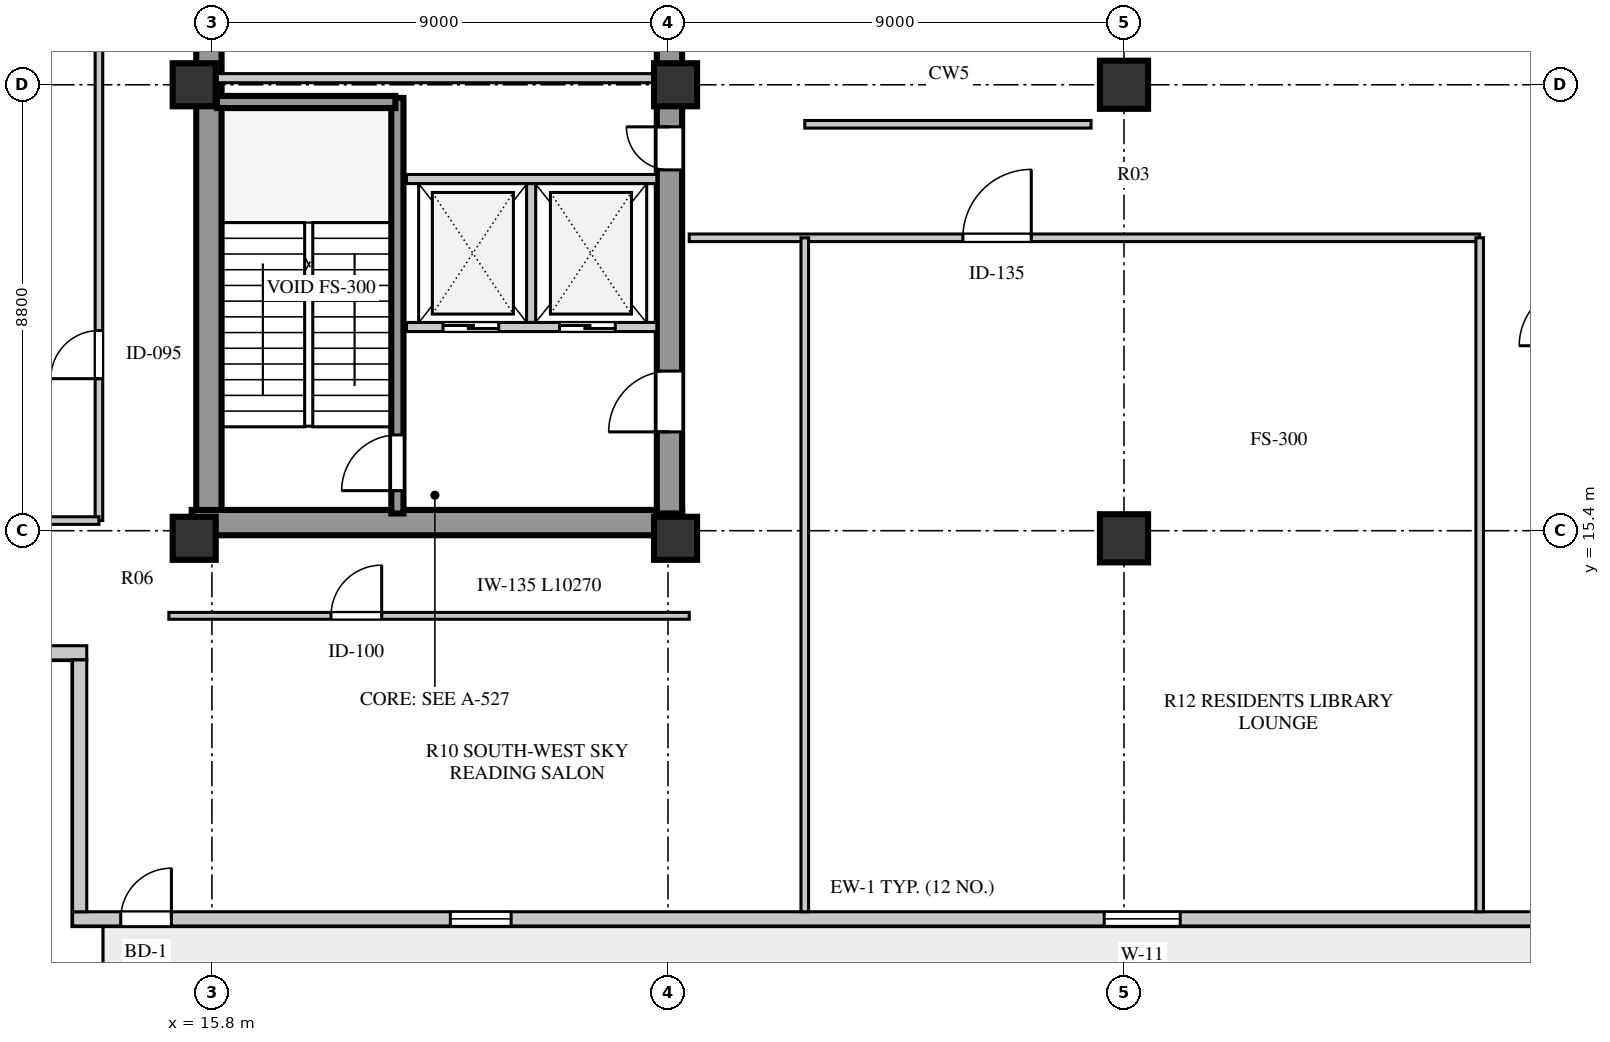
"""IFC4 building model, lengths in metres.
Left out: names, types, materials, properties, quantities, classifications, styles, units other than length and angle.
Written with IfcOpenShell. Run it as: python <this file> out.ifc"""

import sys

from ifc_helpers import new_model, si_unit, direction, frame, frame_2d, origin, origin_2d, place, context, subcontext, project, spatial, rectangle, extrude, element, fill, save


model = new_model("IFC4")
c1 = context("Model", 3, precision=1e-05, world=origin(), true_north=direction((0.0, 1.0)))
c2 = subcontext(c1, "Body", "Model", "MODEL_VIEW")
j1 = project(units=[si_unit("LENGTHUNIT", "METRE"), si_unit("PLANEANGLEUNIT", "RADIAN")], contexts=[c1])
p1 = place(None, origin())
s1 = spatial("IfcSite", under=j1, at=p1, CompositionType="ELEMENT")
p2 = place(p1, origin())
s2 = spatial("IfcBuilding", under=s1, at=p2, CompositionType="ELEMENT")
p3 = place(p2, frame((0.0, 0.0, 208.9)))
s3 = spatial("IfcBuildingStorey", under=s2, at=p3, CompositionType="ELEMENT", Elevation=208.9)
p4 = place(p3, frame((15.4, 15.56, 0.0), z_axis=(0.0, 0.0, 1.0), x_axis=(1.0, 0.0, 0.0)))
e1 = element("IfcWall", 1, at=p4, inside=s3, PredefinedType="SHEAR", context=c2, shape_type="SweptSolid", body=[
    extrude(rectangle(XDim=9.68, YDim=0.5, at=frame_2d((4.84, 0.0))), origin(), (0.0, 0.0, 1.0), 4.96),
])
p5 = place(p3, frame((15.74, 15.81, 0.0), z_axis=(0.0, 0.0, 1.0), x_axis=(0.0, 1.0, 0.0)))
e2 = element("IfcWall", 2, at=p5, inside=s3, PredefinedType="SHEAR", context=c2, shape_type="SweptSolid", body=[
    extrude(rectangle(XDim=25.63, YDim=0.5, at=frame_2d((12.815, 0.0))), origin(), (0.0, 0.0, 1.0), 4.96),
])
p6 = place(p3, frame((24.83, 15.74, 0.0), z_axis=(0.0, 0.0, 1.0), x_axis=(0.0, 1.0, 0.0)))
e3 = element("IfcWall", 3, at=p6, inside=s3, PredefinedType="SHEAR", context=c2, shape_type="SweptSolid", body=[
    extrude(rectangle(XDim=25.76, YDim=0.5, at=frame_2d((12.88, 0.0))), origin(), (0.0, 0.0, 1.0), 4.96),
])
p7 = place(p6, frame((1.61, 0.0, 0.0)))
e4 = element("IfcOpeningElement", 4, at=p7, cuts=e3, PredefinedType="OPENING", context=c2, shape_type="SweptSolid", body=[
    extrude(rectangle(XDim=1.2, YDim=2.1, at=frame_2d((0.6, 1.05))), frame((0.0, 0.26, 0.0), z_axis=(0.0, -1.0, 0.0), x_axis=(1.0, 0.0, 0.0)), (0.0, 0.0, 1.0), 0.52),
])
p8 = place(p6, frame((6.78, 0.0, 0.0)))
e5 = element("IfcOpeningElement", 5, at=p8, cuts=e3, PredefinedType="OPENING", context=c2, shape_type="SweptSolid", body=[
    extrude(rectangle(XDim=0.85, YDim=2.06, at=frame_2d((0.425, 1.03))), frame((0.0, 0.26, 0.0), z_axis=(0.0, -1.0, 0.0), x_axis=(1.0, 0.0, 0.0)), (0.0, 0.0, 1.0), 0.52),
])
p9 = place(p6, frame((12.11, 0.0, 0.0)))
e6 = element("IfcOpeningElement", 6, at=p9, cuts=e3, PredefinedType="OPENING", context=c2, shape_type="SweptSolid", body=[
    extrude(rectangle(XDim=1.5, YDim=2.12, at=frame_2d((0.75, 1.06))), frame((0.0, 0.26, 0.0), z_axis=(0.0, -1.0, 0.0), x_axis=(1.0, 0.0, 0.0)), (0.0, 0.0, 1.0), 0.52),
])
p10 = place(p6, frame((20.11, 0.0, 0.0)))
e7 = element("IfcOpeningElement", 7, at=p10, cuts=e3, PredefinedType="OPENING", context=c2, shape_type="SweptSolid", body=[
    extrude(rectangle(XDim=1.2, YDim=2.12, at=frame_2d((0.6, 1.06))), frame((0.0, 0.26, 0.0), z_axis=(0.0, -1.0, 0.0), x_axis=(1.0, 0.0, 0.0)), (0.0, 0.0, 1.0), 0.52),
])
p11 = place(p6, frame((24.01, 0.0, 0.0)))
e8 = element("IfcOpeningElement", 8, at=p11, cuts=e3, PredefinedType="OPENING", context=c2, shape_type="SweptSolid", body=[
    extrude(rectangle(XDim=0.95, YDim=2.1, at=frame_2d((0.475, 1.05))), frame((0.0, 0.26, 0.0), z_axis=(0.0, -1.0, 0.0), x_axis=(1.0, 0.0, 0.0)), (0.0, 0.0, 1.0), 0.52),
])
for number, where, z_axis, x_axis in (
    (9, (15.45, 15.25, 0.0), (0.0, 0.0, 1.0), (1.0, 0.0, 0.0)),
    (10, (15.45, 24.2, 0.0), (0.0, 0.0, 1.0), (1.0, 0.0, 0.0)),
    (11, (24.95, 15.25, 0.0), (0.0, 0.0, 1.0), (1.0, 0.0, 0.0)),
    (12, (24.95, 24.2, 0.0), (0.0, 0.0, 1.0), (1.0, 0.0, 0.0)),
):
    element("IfcColumn", number, at=place(p3, frame(where, z_axis=z_axis, x_axis=x_axis)), inside=s3, PredefinedType="COLUMN", context=c2, shape_type="SweptSolid", body=[
        extrude(rectangle(XDim=0.85, YDim=0.85, at=origin_2d()), origin(), (0.0, 0.0, 1.0), 4.96),
    ])
for number, where, z_axis, x_axis in (
    (13, (33.8, 15.25, 0.0), (0.0, 0.0, 1.0), (1.0, 0.0, 0.0)),
    (14, (33.8, 24.2, 0.0), (0.0, 0.0, 1.0), (1.0, 0.0, 0.0)),
):
    element("IfcColumn", number, at=place(p3, frame(where, z_axis=z_axis, x_axis=x_axis)), inside=s3, PredefinedType="COLUMN", context=c2, shape_type="SweptSolid", body=[
        extrude(rectangle(XDim=0.95, YDim=0.95, at=origin_2d()), origin(), (0.0, 0.0, 1.0), 4.96),
    ])
p12 = place(p3, frame((13.05, 7.74, 0.0), z_axis=(0.0, 0.0, 1.0), x_axis=(1.0, 0.0, 0.0)))
e15 = element("IfcWall", 15, at=p12, inside=s3, PredefinedType="STANDARD", context=c2, shape_type="SweptSolid", body=[
    extrude(rectangle(XDim=32.5, YDim=0.28, at=frame_2d((16.25, 0.0))), origin(), (0.0, 0.0, 1.0), 4.96),
])
p13 = place(p12, frame((0.95, 0.0, 0.0)))
e16 = element("IfcOpeningElement", 16, at=p13, cuts=e15, PredefinedType="OPENING", context=c2, shape_type="SweptSolid", body=[
    extrude(rectangle(XDim=1.0, YDim=2.05, at=frame_2d((0.5, 1.025))), frame((0.0, 0.15, 0.0), z_axis=(0.0, -1.0, 0.0), x_axis=(1.0, 0.0, 0.0)), (0.0, 0.0, 1.0), 0.3),
])
p14 = place(p12, frame((7.455, 0.0, 0.65)))
e17 = element("IfcOpeningElement", 17, at=p14, cuts=e15, PredefinedType="OPENING", context=c2, shape_type="SweptSolid", body=[
    extrude(rectangle(XDim=1.2, YDim=1.25, at=frame_2d((0.6, 0.625))), frame((0.0, 0.15, 0.0), z_axis=(0.0, -1.0, 0.0), x_axis=(1.0, 0.0, 0.0)), (0.0, 0.0, 1.0), 0.3),
])
p15 = place(p12, frame((20.36, 0.0, 0.65)))
e18 = element("IfcOpeningElement", 18, at=p15, cuts=e15, PredefinedType="OPENING", context=c2, shape_type="SweptSolid", body=[
    extrude(rectangle(XDim=1.5, YDim=1.3, at=frame_2d((0.75, 0.65))), frame((0.0, 0.15, 0.0), z_axis=(0.0, -1.0, 0.0), x_axis=(1.0, 0.0, 0.0)), (0.0, 0.0, 1.0), 0.3),
])
p16 = place(p12, frame((29.48, 0.0, 0.65)))
e19 = element("IfcOpeningElement", 19, at=p16, cuts=e15, PredefinedType="OPENING", context=c2, shape_type="SweptSolid", body=[
    extrude(rectangle(XDim=1.2, YDim=1.25, at=frame_2d((0.6, 0.625))), frame((0.0, 0.15, 0.0), z_axis=(0.0, -1.0, 0.0), x_axis=(1.0, 0.0, 0.0)), (0.0, 0.0, 1.0), 0.3),
])
p17 = place(p3, frame((7.8, 12.99, 0.0), z_axis=(0.0, 0.0, 1.0), x_axis=(1.0, 0.0, 0.0)))
e20 = element("IfcWall", 20, at=p17, inside=s3, PredefinedType="STANDARD", context=c2, shape_type="SweptSolid", body=[
    extrude(rectangle(XDim=5.53, YDim=0.28, at=frame_2d((2.765, 0.0))), origin(), (0.0, 0.0, 1.0), 4.96),
])
p18 = place(p3, frame((13.19, 12.85, 0.0), z_axis=(0.0, 0.0, 1.0), x_axis=(0.0, -1.0, 0.0)))
e21 = element("IfcWall", 21, at=p18, inside=s3, PredefinedType="STANDARD", context=c2, shape_type="SweptSolid", body=[
    extrude(rectangle(XDim=4.97, YDim=0.28, at=frame_2d((2.485, 0.0))), origin(), (0.0, 0.0, 1.0), 4.96),
])
p19 = place(p3, frame((19.46, 15.74, 0.0), z_axis=(0.0, 0.0, 1.0), x_axis=(0.0, 1.0, 0.0)))
e22 = element("IfcWall", 22, at=p19, inside=s3, PredefinedType="SHEAR", context=c2, shape_type="SweptSolid", body=[
    extrude(rectangle(XDim=8.2, YDim=0.24, at=frame_2d((4.1, 0.0))), origin(), (0.0, 0.0, 1.0), 5.2),
])
p20 = place(p19, frame((0.45, 0.0, 0.0)))
e23 = element("IfcOpeningElement", 23, at=p20, cuts=e22, PredefinedType="OPENING", context=c2, shape_type="SweptSolid", body=[
    extrude(rectangle(XDim=1.1, YDim=2.1, at=frame_2d((0.55, 1.05))), frame((0.0, 0.13, 0.0), z_axis=(0.0, -1.0, 0.0), x_axis=(1.0, 0.0, 0.0)), (0.0, 0.0, 1.0), 0.26),
])
p21 = place(p3, frame((15.9, 23.86, 0.0), z_axis=(0.0, 0.0, 1.0), x_axis=(1.0, 0.0, 0.0)))
e24 = element("IfcWall", 24, at=p21, inside=s3, PredefinedType="SHEAR", context=c2, shape_type="SweptSolid", body=[
    extrude(rectangle(XDim=3.52, YDim=0.24, at=frame_2d((1.76, 0.0))), origin(), (0.0, 0.0, 1.0), 5.2),
])
p22 = place(p3, frame((19.64, 19.42, 0.0), z_axis=(0.0, 0.0, 1.0), x_axis=(1.0, 0.0, 0.0)))
e25 = element("IfcWall", 25, at=p22, inside=s3, PredefinedType="SOLIDWALL", context=c2, shape_type="SweptSolid", body=[
    extrude(rectangle(XDim=4.94, YDim=0.18, at=frame_2d((2.47, 0.0))), origin(), (0.0, 0.0, 1.0), 4.96),
])
p23 = place(p22, frame((0.72, 0.0, 0.0)))
e26 = element("IfcOpeningElement", 26, at=p23, cuts=e25, PredefinedType="OPENING", context=c2, shape_type="SweptSolid", body=[
    extrude(rectangle(XDim=1.1, YDim=2.1, at=frame_2d((0.55, 1.05))), frame((0.0, 0.1, 0.0), z_axis=(0.0, -1.0, 0.0), x_axis=(1.0, 0.0, 0.0)), (0.0, 0.0, 1.0), 0.2),
])
p24 = place(p22, frame((3.02, 0.0, 0.0)))
e27 = element("IfcOpeningElement", 27, at=p24, cuts=e25, PredefinedType="OPENING", context=c2, shape_type="SweptSolid", body=[
    extrude(rectangle(XDim=1.1, YDim=2.1, at=frame_2d((0.55, 1.05))), frame((0.0, 0.1, 0.0), z_axis=(0.0, -1.0, 0.0), x_axis=(1.0, 0.0, 0.0)), (0.0, 0.0, 1.0), 0.2),
])
p25 = place(p3, frame((22.1, 19.51, 0.0), z_axis=(0.0, 0.0, 1.0), x_axis=(0.0, 1.0, 0.0)))
e28 = element("IfcWall", 28, at=p25, inside=s3, PredefinedType="SOLIDWALL", context=c2, shape_type="SweptSolid", body=[
    extrude(rectangle(XDim=2.74, YDim=0.18, at=frame_2d((1.37, 0.0))), origin(), (0.0, 0.0, 1.0), 4.96),
])
p26 = place(p3, frame((19.64, 22.34, 0.0), z_axis=(0.0, 0.0, 1.0), x_axis=(1.0, 0.0, 0.0)))
e29 = element("IfcWall", 29, at=p26, inside=s3, PredefinedType="SOLIDWALL", context=c2, shape_type="SweptSolid", body=[
    extrude(rectangle(XDim=4.94, YDim=0.18, at=frame_2d((2.47, 0.0))), origin(), (0.0, 0.0, 1.0), 4.96),
])
p27 = place(p3, frame((15.9, 24.33, 0.0), z_axis=(0.0, 0.0, 1.0), x_axis=(1.0, 0.0, 0.0)))
e30 = element("IfcWall", 30, at=p27, inside=s3, PredefinedType="SOLIDWALL", context=c2, shape_type="SweptSolid", body=[
    extrude(rectangle(XDim=8.68, YDim=0.18, at=frame_2d((4.34, 0.0))), origin(), (0.0, 0.0, 1.0), 4.31),
])
p28 = place(p3, frame((13.57, 15.6, 0.0), z_axis=(0.0, 0.0, 1.0), x_axis=(0.0, 1.0, 0.0)))
e31 = element("IfcWall", 31, at=p28, inside=s3, PredefinedType="PARTITIONING", context=c2, shape_type="SweptSolid", body=[
    extrude(rectangle(XDim=26.0, YDim=0.15, at=frame_2d((13.0, 0.0))), origin(), (0.0, 0.0, 1.0), 4.96),
])
p29 = place(p28, frame((2.8, 0.0, 0.0)))
e32 = element("IfcOpeningElement", 32, at=p29, cuts=e31, PredefinedType="OPENING", context=c2, shape_type="SweptSolid", body=[
    extrude(rectangle(XDim=0.95, YDim=2.08, at=frame_2d((0.475, 1.04))), frame((0.0, 0.085, 0.0), z_axis=(0.0, -1.0, 0.0), x_axis=(1.0, 0.0, 0.0)), (0.0, 0.0, 1.0), 0.17),
])
p30 = place(p3, frame((8.08, 15.6, 0.0), z_axis=(0.0, 0.0, 1.0), x_axis=(1.0, 0.0, 0.0)))
e33 = element("IfcWall", 33, at=p30, inside=s3, PredefinedType="PARTITIONING", context=c2, shape_type="SweptSolid", body=[
    extrude(rectangle(XDim=5.49, YDim=0.15, at=frame_2d((2.745, 0.0))), origin(), (0.0, 0.0, 1.0), 3.88),
])
p31 = place(p3, frame((14.95, 13.72, 0.0), z_axis=(0.0, 0.0, 1.0), x_axis=(1.0, 0.0, 0.0)))
e34 = element("IfcWall", 34, at=p31, inside=s3, PredefinedType="PARTITIONING", context=c2, shape_type="SweptSolid", body=[
    extrude(rectangle(XDim=10.27, YDim=0.135, at=frame_2d((5.135, 0.0))), origin(), (0.0, 0.0, 1.0), 4.96),
])
p32 = place(p31, frame((3.2, 0.0, 0.0)))
e35 = element("IfcOpeningElement", 35, at=p32, cuts=e34, PredefinedType="OPENING", context=c2, shape_type="SweptSolid", body=[
    extrude(rectangle(XDim=1.0, YDim=2.08, at=frame_2d((0.5, 1.04))), frame((0.0, 0.078, 0.0), z_axis=(0.0, -1.0, 0.0), x_axis=(1.0, 0.0, 0.0)), (0.0, 0.0, 1.0), 0.155),
])
p33 = place(p3, frame((25.22, 21.18, 0.0), z_axis=(0.0, 0.0, 1.0), x_axis=(1.0, 0.0, 0.0)))
e36 = element("IfcWall", 36, at=p33, inside=s3, PredefinedType="PARTITIONING", context=c2, shape_type="SweptSolid", body=[
    extrude(rectangle(XDim=15.6, YDim=0.15, at=frame_2d((7.8, 0.0))), origin(), (0.0, 0.0, 1.0), 4.61),
])
p34 = place(p33, frame((5.4, 0.0, 0.0)))
e37 = element("IfcOpeningElement", 37, at=p34, cuts=e36, PredefinedType="OPENING", context=c2, shape_type="SweptSolid", body=[
    extrude(rectangle(XDim=1.35, YDim=2.1, at=frame_2d((0.675, 1.05))), frame((0.0, 0.085, 0.0), z_axis=(0.0, -1.0, 0.0), x_axis=(1.0, 0.0, 0.0)), (0.0, 0.0, 1.0), 0.17),
])
p35 = place(p3, frame((27.5, 7.88, 0.0), z_axis=(0.0, 0.0, 1.0), x_axis=(0.0, 1.0, 0.0)))
e38 = element("IfcWall", 38, at=p35, inside=s3, PredefinedType="PARTITIONING", context=c2, shape_type="SweptSolid", body=[
    extrude(rectangle(XDim=13.3, YDim=0.15, at=frame_2d((6.65, 0.0))), origin(), (0.0, 0.0, 1.0), 4.96),
])
p36 = place(p3, frame((27.5, 23.42, 0.0), z_axis=(0.0, 0.0, 1.0), x_axis=(1.0, 0.0, 0.0)))
e39 = element("IfcWall", 39, at=p36, inside=s3, PredefinedType="PARTITIONING", context=c2, shape_type="SweptSolid", body=[
    extrude(rectangle(XDim=5.65, YDim=0.15, at=frame_2d((2.825, 0.0))), origin(), (0.0, 0.0, 1.0), 4.96),
])
p37 = place(p3, frame((40.82, 7.88, 0.0), z_axis=(0.0, 0.0, 1.0), x_axis=(0.0, 1.0, 0.0)))
e40 = element("IfcWall", 40, at=p37, inside=s3, PredefinedType="PARTITIONING", context=c2, shape_type="SweptSolid", body=[
    extrude(rectangle(XDim=13.3, YDim=0.15, at=frame_2d((6.65, 0.0))), origin(), (0.0, 0.0, 1.0), 4.96),
])
p38 = place(p13, frame((1.0, 0.0, 0.0), z_axis=(0.0, 0.0, 1.0), x_axis=(-1.0, 0.0, 0.0)))
e41 = element("IfcDoor", 41, at=p38, inside=s3, OperationType="SINGLE_SWING_LEFT", PredefinedType="DOOR", context=c2, shape_type="SweptSolid", body=[
    extrude(rectangle(XDim=1.0, YDim=2.05, at=frame_2d((0.5, 1.025))), frame((0.0, 0.025, 0.0), z_axis=(0.0, -1.0, 0.0), x_axis=(1.0, 0.0, 0.0)), (0.0, 0.0, 1.0), 0.05),
])
fill(e16, e41)
p39 = place(p14, origin())
e42 = element("IfcWindow", 42, at=p39, inside=s3, PartitioningType="SINGLE_PANEL", PredefinedType="WINDOW", context=c2, shape_type="SweptSolid", body=[
    extrude(rectangle(XDim=1.2, YDim=1.25, at=frame_2d((0.6, 0.625))), frame((0.0, 0.03, 0.0), z_axis=(0.0, -1.0, 0.0), x_axis=(1.0, 0.0, 0.0)), (0.0, 0.0, 1.0), 0.06),
])
fill(e17, e42)
p40 = place(p15, origin())
e43 = element("IfcWindow", 43, at=p40, inside=s3, PartitioningType="SINGLE_PANEL", PredefinedType="WINDOW", context=c2, shape_type="SweptSolid", body=[
    extrude(rectangle(XDim=1.5, YDim=1.3, at=frame_2d((0.75, 0.65))), frame((0.0, 0.03, 0.0), z_axis=(0.0, -1.0, 0.0), x_axis=(1.0, 0.0, 0.0)), (0.0, 0.0, 1.0), 0.06),
])
fill(e18, e43)
p41 = place(p20, origin())
e44 = element("IfcDoor", 44, at=p41, inside=s3, OperationType="SINGLE_SWING_LEFT", PredefinedType="DOOR", context=c2, shape_type="SweptSolid", body=[
    extrude(rectangle(XDim=1.1, YDim=2.1, at=frame_2d((0.55, 1.05))), frame((0.0, 0.025, 0.0), z_axis=(0.0, -1.0, 0.0), x_axis=(1.0, 0.0, 0.0)), (0.0, 0.0, 1.0), 0.05),
])
fill(e23, e44)
p42 = place(p23, origin())
e45 = element("IfcDoor", 45, at=p42, inside=s3, OperationType="DOUBLE_DOOR_SLIDING", PredefinedType="DOOR", context=c2, shape_type="SweptSolid", body=[
    extrude(rectangle(XDim=1.1, YDim=2.1, at=frame_2d((0.55, 1.05))), frame((0.0, 0.025, 0.0), z_axis=(0.0, -1.0, 0.0), x_axis=(1.0, 0.0, 0.0)), (0.0, 0.0, 1.0), 0.05),
])
fill(e26, e45)
p43 = place(p24, origin())
e46 = element("IfcDoor", 46, at=p43, inside=s3, OperationType="DOUBLE_DOOR_SLIDING", PredefinedType="DOOR", context=c2, shape_type="SweptSolid", body=[
    extrude(rectangle(XDim=1.1, YDim=2.1, at=frame_2d((0.55, 1.05))), frame((0.0, 0.025, 0.0), z_axis=(0.0, -1.0, 0.0), x_axis=(1.0, 0.0, 0.0)), (0.0, 0.0, 1.0), 0.05),
])
fill(e27, e46)
p44 = place(p7, frame((1.2, 0.0, 0.0), z_axis=(0.0, 0.0, 1.0), x_axis=(-1.0, 0.0, 0.0)))
e47 = element("IfcDoor", 47, at=p44, inside=s3, OperationType="SINGLE_SWING_RIGHT", PredefinedType="DOOR", context=c2, shape_type="SweptSolid", body=[
    extrude(rectangle(XDim=1.2, YDim=2.1, at=frame_2d((0.6, 1.05))), frame((0.0, 0.025, 0.0), z_axis=(0.0, -1.0, 0.0), x_axis=(1.0, 0.0, 0.0)), (0.0, 0.0, 1.0), 0.05),
])
fill(e4, e47)
p45 = place(p8, frame((0.85, 0.0, 0.0), z_axis=(0.0, 0.0, 1.0), x_axis=(-1.0, 0.0, 0.0)))
e48 = element("IfcDoor", 48, at=p45, inside=s3, OperationType="SINGLE_SWING_LEFT", PredefinedType="DOOR", context=c2, shape_type="SweptSolid", body=[
    extrude(rectangle(XDim=0.85, YDim=2.06, at=frame_2d((0.425, 1.03))), frame((0.0, 0.025, 0.0), z_axis=(0.0, -1.0, 0.0), x_axis=(1.0, 0.0, 0.0)), (0.0, 0.0, 1.0), 0.05),
])
fill(e5, e48)
p46 = place(p29, origin())
e49 = element("IfcDoor", 49, at=p46, inside=s3, OperationType="SINGLE_SWING_LEFT", PredefinedType="DOOR", context=c2, shape_type="SweptSolid", body=[
    extrude(rectangle(XDim=0.95, YDim=2.08, at=frame_2d((0.475, 1.04))), frame((0.0, 0.025, 0.0), z_axis=(0.0, -1.0, 0.0), x_axis=(1.0, 0.0, 0.0)), (0.0, 0.0, 1.0), 0.05),
])
fill(e32, e49)
p47 = place(p32, frame((1.0, 0.0, 0.0), z_axis=(0.0, 0.0, 1.0), x_axis=(-1.0, 0.0, 0.0)))
e50 = element("IfcDoor", 50, at=p47, inside=s3, OperationType="SINGLE_SWING_LEFT", PredefinedType="DOOR", context=c2, shape_type="SweptSolid", body=[
    extrude(rectangle(XDim=1.0, YDim=2.08, at=frame_2d((0.5, 1.04))), frame((0.0, 0.025, 0.0), z_axis=(0.0, -1.0, 0.0), x_axis=(1.0, 0.0, 0.0)), (0.0, 0.0, 1.0), 0.05),
])
fill(e35, e50)
p48 = place(p34, frame((1.35, 0.0, 0.0), z_axis=(0.0, 0.0, 1.0), x_axis=(-1.0, 0.0, 0.0)))
e51 = element("IfcDoor", 51, at=p48, inside=s3, OperationType="SINGLE_SWING_LEFT", PredefinedType="DOOR", context=c2, shape_type="SweptSolid", body=[
    extrude(rectangle(XDim=1.35, YDim=2.1, at=frame_2d((0.675, 1.05))), frame((0.0, 0.025, 0.0), z_axis=(0.0, -1.0, 0.0), x_axis=(1.0, 0.0, 0.0)), (0.0, 0.0, 1.0), 0.05),
])
fill(e37, e51)
save(model, sys.argv[1])
